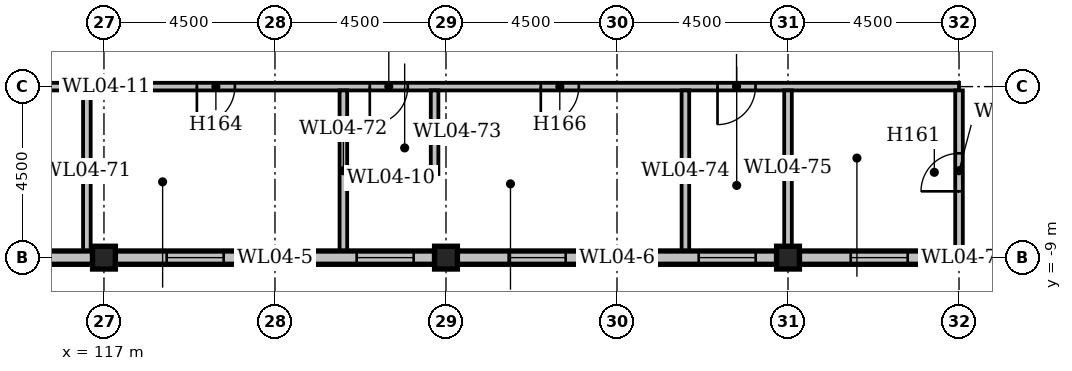
"""IFC4 building model, lengths in metres.
Left out: names, types, materials, properties, quantities, classifications, styles, units other than length and angle.
Written with IfcOpenShell. Run it as: python <this file> out.ifc"""

import sys

from ifc_helpers import new_model, si_unit, direction, frame, frame_2d, origin, origin_2d, place, context, subcontext, project, spatial, rectangle, extrude, element, fill, save


model = new_model("IFC4")
c1 = context("Model", 3, precision=1e-05, world=origin(), true_north=direction((0.0, 1.0)))
c2 = subcontext(c1, "Body", "Model", "MODEL_VIEW")
j1 = project(units=[si_unit("LENGTHUNIT", "METRE"), si_unit("PLANEANGLEUNIT", "RADIAN")], contexts=[c1])
p1 = place(None, origin())
s1 = spatial("IfcSite", under=j1, at=p1, CompositionType="ELEMENT")
p2 = place(p1, origin())
s2 = spatial("IfcBuilding", under=s1, at=p2, CompositionType="ELEMENT")
p3 = place(p2, frame((0.0, 0.0, 24.0)))
s3 = spatial("IfcBuildingStorey", under=s2, at=p3, CompositionType="ELEMENT", Elevation=24.0)
for number, where, z_axis, x_axis in (
    (1, (117.0, -9.0, 0.0), (0.0, 0.0, 1.0), (1.0, 0.0, 0.0)),
    (2, (126.0, -9.0, 0.0), (0.0, 0.0, 1.0), (1.0, 0.0, 0.0)),
    (3, (135.0, -9.0, 0.0), (0.0, 0.0, 1.0), (1.0, 0.0, 0.0)),
):
    element("IfcColumn", number, at=place(p3, frame(where, z_axis=z_axis, x_axis=x_axis)), inside=s3, PredefinedType="COLUMN", context=c2, shape_type="SweptSolid", body=[
        extrude(rectangle(XDim=0.6, YDim=0.6, at=origin_2d()), origin(), (0.0, 0.0, 1.0), 4.7),
    ])
p4 = place(p3, frame((108.3, -9.0, 0.0), z_axis=(0.0, 0.0, 1.0), x_axis=(1.0, 0.0, 0.0)))
e4 = element("IfcWall", 4, at=p4, inside=s3, PredefinedType="STANDARD", context=c2, shape_type="SweptSolid", body=[
    extrude(rectangle(XDim=8.4, YDim=0.35, at=frame_2d((4.2, 0.0))), origin(), (0.0, 0.0, 1.0), 4.1),
])
p5 = place(p4, frame((1.35, 0.0, 1.0)))
e5 = element("IfcOpeningElement", 5, at=p5, cuts=e4, PredefinedType="OPENING", context=c2, shape_type="SweptSolid", body=[
    extrude(rectangle(XDim=1.5, YDim=2.4, at=frame_2d((0.75, 1.2))), frame((0.0, 0.187, 0.0), z_axis=(0.0, -1.0, 0.0), x_axis=(1.0, 0.0, 0.0)), (0.0, 0.0, 1.0), 0.374),
])
p6 = place(p4, frame((5.55, 0.0, 1.0)))
e6 = element("IfcOpeningElement", 6, at=p6, cuts=e4, PredefinedType="OPENING", context=c2, shape_type="SweptSolid", body=[
    extrude(rectangle(XDim=1.5, YDim=2.4, at=frame_2d((0.75, 1.2))), frame((0.0, 0.187, 0.0), z_axis=(0.0, -1.0, 0.0), x_axis=(1.0, 0.0, 0.0)), (0.0, 0.0, 1.0), 0.374),
])
p7 = place(p3, frame((117.3, -9.0, 0.0), z_axis=(0.0, 0.0, 1.0), x_axis=(1.0, 0.0, 0.0)))
e7 = element("IfcWall", 7, at=p7, inside=s3, PredefinedType="STANDARD", context=c2, shape_type="SweptSolid", body=[
    extrude(rectangle(XDim=8.4, YDim=0.35, at=frame_2d((4.2, 0.0))), origin(), (0.0, 0.0, 1.0), 4.1),
])
p8 = place(p7, frame((1.35, 0.0, 1.0)))
e8 = element("IfcOpeningElement", 8, at=p8, cuts=e7, PredefinedType="OPENING", context=c2, shape_type="SweptSolid", body=[
    extrude(rectangle(XDim=1.5, YDim=2.4, at=frame_2d((0.75, 1.2))), frame((0.0, 0.187, 0.0), z_axis=(0.0, -1.0, 0.0), x_axis=(1.0, 0.0, 0.0)), (0.0, 0.0, 1.0), 0.374),
])
p9 = place(p7, frame((6.35, 0.0, 1.0)))
e9 = element("IfcOpeningElement", 9, at=p9, cuts=e7, PredefinedType="OPENING", context=c2, shape_type="SweptSolid", body=[
    extrude(rectangle(XDim=1.5, YDim=2.4, at=frame_2d((0.75, 1.2))), frame((0.0, 0.187, 0.0), z_axis=(0.0, -1.0, 0.0), x_axis=(1.0, 0.0, 0.0)), (0.0, 0.0, 1.0), 0.374),
])
p10 = place(p3, frame((126.3, -9.0, 0.0), z_axis=(0.0, 0.0, 1.0), x_axis=(1.0, 0.0, 0.0)))
e10 = element("IfcWall", 10, at=p10, inside=s3, PredefinedType="STANDARD", context=c2, shape_type="SweptSolid", body=[
    extrude(rectangle(XDim=8.4, YDim=0.35, at=frame_2d((4.2, 0.0))), origin(), (0.0, 0.0, 1.0), 4.1),
])
p11 = place(p10, frame((1.35, 0.0, 1.0)))
e11 = element("IfcOpeningElement", 11, at=p11, cuts=e10, PredefinedType="OPENING", context=c2, shape_type="SweptSolid", body=[
    extrude(rectangle(XDim=1.5, YDim=2.4, at=frame_2d((0.75, 1.2))), frame((0.0, 0.187, 0.0), z_axis=(0.0, -1.0, 0.0), x_axis=(1.0, 0.0, 0.0)), (0.0, 0.0, 1.0), 0.374),
])
p12 = place(p10, frame((6.35, 0.0, 1.0)))
e12 = element("IfcOpeningElement", 12, at=p12, cuts=e10, PredefinedType="OPENING", context=c2, shape_type="SweptSolid", body=[
    extrude(rectangle(XDim=1.5, YDim=2.4, at=frame_2d((0.75, 1.2))), frame((0.0, 0.187, 0.0), z_axis=(0.0, -1.0, 0.0), x_axis=(1.0, 0.0, 0.0)), (0.0, 0.0, 1.0), 0.374),
])
p13 = place(p3, frame((135.3, -9.0, 0.0), z_axis=(0.0, 0.0, 1.0), x_axis=(1.0, 0.0, 0.0)))
e13 = element("IfcWall", 13, at=p13, inside=s3, PredefinedType="STANDARD", context=c2, shape_type="SweptSolid", body=[
    extrude(rectangle(XDim=8.4, YDim=0.35, at=frame_2d((4.2, 0.0))), origin(), (0.0, 0.0, 1.0), 4.1),
])
p14 = place(p13, frame((1.35, 0.0, 1.0)))
e14 = element("IfcOpeningElement", 14, at=p14, cuts=e13, PredefinedType="OPENING", context=c2, shape_type="SweptSolid", body=[
    extrude(rectangle(XDim=1.5, YDim=2.4, at=frame_2d((0.75, 1.2))), frame((0.0, 0.187, 0.0), z_axis=(0.0, -1.0, 0.0), x_axis=(1.0, 0.0, 0.0)), (0.0, 0.0, 1.0), 0.374),
])
p15 = place(p3, frame((123.4, -6.9, 0.0), z_axis=(0.0, 0.0, 1.0), x_axis=(1.0, 0.0, 0.0)))
e15 = element("IfcWall", 15, at=p15, inside=s3, PredefinedType="STANDARD", context=c2, shape_type="SweptSolid", body=[
    extrude(rectangle(XDim=2.3, YDim=0.2, at=frame_2d((1.15, 0.0))), origin(), (0.0, 0.0, 1.0), 4.7),
])
p16 = place(p3, frame((94.625, -4.5, 0.0), z_axis=(0.0, 0.0, 1.0), x_axis=(1.0, 0.0, 0.0)))
e16 = element("IfcWall", 16, at=p16, inside=s3, PredefinedType="STANDARD", context=c2, shape_type="SweptSolid", body=[
    extrude(rectangle(XDim=44.875, YDim=0.2, at=frame_2d((22.438, 0.0))), origin(), (0.0, 0.0, 1.0), 4.7),
])
p17 = place(p16, frame((3.42, 0.0, 0.0)))
e17 = element("IfcOpeningElement", 17, at=p17, cuts=e16, PredefinedType="OPENING", context=c2, shape_type="SweptSolid", body=[
    extrude(rectangle(XDim=1.0, YDim=2.1, at=frame_2d((0.5, 1.05))), frame((0.0, 0.112, 0.0), z_axis=(0.0, -1.0, 0.0), x_axis=(1.0, 0.0, 0.0)), (0.0, 0.0, 1.0), 0.224),
])
p18 = place(p16, frame((10.17, 0.0, 0.0)))
e18 = element("IfcOpeningElement", 18, at=p18, cuts=e16, PredefinedType="OPENING", context=c2, shape_type="SweptSolid", body=[
    extrude(rectangle(XDim=1.0, YDim=2.1, at=frame_2d((0.5, 1.05))), frame((0.0, 0.112, 0.0), z_axis=(0.0, -1.0, 0.0), x_axis=(1.0, 0.0, 0.0)), (0.0, 0.0, 1.0), 0.224),
])
p19 = place(p16, frame((17.17, 0.0, 0.0)))
e19 = element("IfcOpeningElement", 19, at=p19, cuts=e16, PredefinedType="OPENING", context=c2, shape_type="SweptSolid", body=[
    extrude(rectangle(XDim=1.0, YDim=2.1, at=frame_2d((0.5, 1.05))), frame((0.0, 0.112, 0.0), z_axis=(0.0, -1.0, 0.0), x_axis=(1.0, 0.0, 0.0)), (0.0, 0.0, 1.0), 0.224),
])
p20 = place(p16, frame((24.82, 0.0, 0.0)))
e20 = element("IfcOpeningElement", 20, at=p20, cuts=e16, PredefinedType="OPENING", context=c2, shape_type="SweptSolid", body=[
    extrude(rectangle(XDim=1.0, YDim=2.1, at=frame_2d((0.5, 1.05))), frame((0.0, 0.112, 0.0), z_axis=(0.0, -1.0, 0.0), x_axis=(1.0, 0.0, 0.0)), (0.0, 0.0, 1.0), 0.224),
])
p21 = place(p16, frame((29.37, 0.0, 0.0)))
e21 = element("IfcOpeningElement", 21, at=p21, cuts=e16, PredefinedType="OPENING", context=c2, shape_type="SweptSolid", body=[
    extrude(rectangle(XDim=1.0, YDim=2.1, at=frame_2d((0.5, 1.05))), frame((0.0, 0.112, 0.0), z_axis=(0.0, -1.0, 0.0), x_axis=(1.0, 0.0, 0.0)), (0.0, 0.0, 1.0), 0.224),
])
p22 = place(p16, frame((33.87, 0.0, 0.0)))
e22 = element("IfcOpeningElement", 22, at=p22, cuts=e16, PredefinedType="OPENING", context=c2, shape_type="SweptSolid", body=[
    extrude(rectangle(XDim=1.0, YDim=2.1, at=frame_2d((0.5, 1.05))), frame((0.0, 0.112, 0.0), z_axis=(0.0, -1.0, 0.0), x_axis=(1.0, 0.0, 0.0)), (0.0, 0.0, 1.0), 0.224),
])
p23 = place(p16, frame((38.52, 0.0, 0.0)))
e23 = element("IfcOpeningElement", 23, at=p23, cuts=e16, PredefinedType="OPENING", context=c2, shape_type="SweptSolid", body=[
    extrude(rectangle(XDim=1.0, YDim=2.1, at=frame_2d((0.5, 1.05))), frame((0.0, 0.112, 0.0), z_axis=(0.0, -1.0, 0.0), x_axis=(1.0, 0.0, 0.0)), (0.0, 0.0, 1.0), 0.224),
])
for number, where, z_axis, x_axis in (
    (24, (116.55, -8.825, 0.0), (0.0, 0.0, 1.0), (0.0, 1.0, 0.0)),
    (25, (123.3, -8.825, 0.0), (0.0, 0.0, 1.0), (0.0, 1.0, 0.0)),
):
    element("IfcWall", number, at=place(p3, frame(where, z_axis=z_axis, x_axis=x_axis)), inside=s3, PredefinedType="STANDARD", context=c2, shape_type="SweptSolid", body=[
        extrude(rectangle(XDim=4.225, YDim=0.2, at=frame_2d((2.112, 0.0))), origin(), (0.0, 0.0, 1.0), 4.7),
    ])
p24 = place(p3, frame((125.7, -6.8, 0.0), z_axis=(0.0, 0.0, 1.0), x_axis=(0.0, 1.0, 0.0)))
e26 = element("IfcWall", 26, at=p24, inside=s3, PredefinedType="STANDARD", context=c2, shape_type="SweptSolid", body=[
    extrude(rectangle(XDim=2.2, YDim=0.2, at=frame_2d((1.1, 0.0))), origin(), (0.0, 0.0, 1.0), 4.7),
])
p25 = place(p3, frame((132.3, -8.825, 0.0), z_axis=(0.0, 0.0, 1.0), x_axis=(0.0, 1.0, 0.0)))
e27 = element("IfcWall", 27, at=p25, inside=s3, PredefinedType="STANDARD", context=c2, shape_type="SweptSolid", body=[
    extrude(rectangle(XDim=4.225, YDim=0.2, at=frame_2d((2.112, 0.0))), origin(), (0.0, 0.0, 1.0), 4.7),
])
p26 = place(p3, frame((135.0, -8.7, 0.0), z_axis=(0.0, 0.0, 1.0), x_axis=(0.0, 1.0, 0.0)))
e28 = element("IfcWall", 28, at=p26, inside=s3, PredefinedType="STANDARD", context=c2, shape_type="SweptSolid", body=[
    extrude(rectangle(XDim=4.1, YDim=0.2, at=frame_2d((2.05, 0.0))), origin(), (0.0, 0.0, 1.0), 4.7),
])
p27 = place(p3, frame((139.5, -8.825, 0.0), z_axis=(0.0, 0.0, 1.0), x_axis=(0.0, 1.0, 0.0)))
e29 = element("IfcWall", 29, at=p27, inside=s3, PredefinedType="STANDARD", context=c2, shape_type="SweptSolid", body=[
    extrude(rectangle(XDim=4.225, YDim=0.2, at=frame_2d((2.112, 0.0))), origin(), (0.0, 0.0, 1.0), 4.7),
])
p28 = place(p27, frame((1.57, 0.0, 0.0)))
e30 = element("IfcOpeningElement", 30, at=p28, cuts=e29, PredefinedType="OPENING", context=c2, shape_type="SweptSolid", body=[
    extrude(rectangle(XDim=1.0, YDim=2.1, at=frame_2d((0.5, 1.05))), frame((0.0, 0.112, 0.0), z_axis=(0.0, -1.0, 0.0), x_axis=(1.0, 0.0, 0.0)), (0.0, 0.0, 1.0), 0.224),
])
p29 = place(p3, frame((89.825, -9.05, 5.0), z_axis=(0.0, 0.0, 1.0), x_axis=(1.0, 0.0, 0.0)))
e31 = element("IfcWall", 31, at=p29, inside=s3, PredefinedType="STANDARD", context=c2, shape_type="SweptSolid", body=[
    extrude(rectangle(XDim=63.35, YDim=0.25, at=frame_2d((31.675, 0.0))), origin(), (0.0, 0.0, 1.0), 1.1),
])
p30 = place(p28, origin())
e32 = element("IfcDoor", 32, at=p30, inside=s3, OperationType="SINGLE_SWING_LEFT", PredefinedType="DOOR", context=c2, shape_type="SweptSolid", body=[
    extrude(rectangle(XDim=1.0, YDim=2.1, at=frame_2d((0.5, 1.05))), frame((0.0, 0.025, 0.0), z_axis=(0.0, -1.0, 0.0), x_axis=(1.0, 0.0, 0.0)), (0.0, 0.0, 1.0), 0.05),
])
fill(e30, e32)
p31 = place(p20, frame((1.0, 0.0, 0.0), z_axis=(0.0, 0.0, 1.0), x_axis=(-1.0, 0.0, 0.0)))
e33 = element("IfcDoor", 33, at=p31, inside=s3, OperationType="SINGLE_SWING_RIGHT", PredefinedType="DOOR", context=c2, shape_type="SweptSolid", body=[
    extrude(rectangle(XDim=1.0, YDim=2.1, at=frame_2d((0.5, 1.05))), frame((0.0, 0.025, 0.0), z_axis=(0.0, -1.0, 0.0), x_axis=(1.0, 0.0, 0.0)), (0.0, 0.0, 1.0), 0.05),
])
fill(e20, e33)
p32 = place(p21, frame((1.0, 0.0, 0.0), z_axis=(0.0, 0.0, 1.0), x_axis=(-1.0, 0.0, 0.0)))
e34 = element("IfcDoor", 34, at=p32, inside=s3, OperationType="SINGLE_SWING_RIGHT", PredefinedType="DOOR", context=c2, shape_type="SweptSolid", body=[
    extrude(rectangle(XDim=1.0, YDim=2.1, at=frame_2d((0.5, 1.05))), frame((0.0, 0.025, 0.0), z_axis=(0.0, -1.0, 0.0), x_axis=(1.0, 0.0, 0.0)), (0.0, 0.0, 1.0), 0.05),
])
fill(e21, e34)
p33 = place(p22, frame((1.0, 0.0, 0.0), z_axis=(0.0, 0.0, 1.0), x_axis=(-1.0, 0.0, 0.0)))
e35 = element("IfcDoor", 35, at=p33, inside=s3, OperationType="SINGLE_SWING_RIGHT", PredefinedType="DOOR", context=c2, shape_type="SweptSolid", body=[
    extrude(rectangle(XDim=1.0, YDim=2.1, at=frame_2d((0.5, 1.05))), frame((0.0, 0.025, 0.0), z_axis=(0.0, -1.0, 0.0), x_axis=(1.0, 0.0, 0.0)), (0.0, 0.0, 1.0), 0.05),
])
fill(e22, e35)
p34 = place(p23, frame((1.0, 0.0, 0.0), z_axis=(0.0, 0.0, 1.0), x_axis=(-1.0, 0.0, 0.0)))
e36 = element("IfcDoor", 36, at=p34, inside=s3, OperationType="SINGLE_SWING_RIGHT", PredefinedType="DOOR", context=c2, shape_type="SweptSolid", body=[
    extrude(rectangle(XDim=1.0, YDim=2.1, at=frame_2d((0.5, 1.05))), frame((0.0, 0.025, 0.0), z_axis=(0.0, -1.0, 0.0), x_axis=(1.0, 0.0, 0.0)), (0.0, 0.0, 1.0), 0.05),
])
fill(e23, e36)
p35 = place(p8, origin())
e37 = element("IfcWindow", 37, at=p35, inside=s3, PartitioningType="SINGLE_PANEL", PredefinedType="WINDOW", context=c2, shape_type="SweptSolid", body=[
    extrude(rectangle(XDim=1.5, YDim=2.4, at=frame_2d((0.75, 1.2))), frame((0.0, 0.03, 0.0), z_axis=(0.0, -1.0, 0.0), x_axis=(1.0, 0.0, 0.0)), (0.0, 0.0, 1.0), 0.06),
])
fill(e8, e37)
p36 = place(p9, origin())
e38 = element("IfcWindow", 38, at=p36, inside=s3, PartitioningType="SINGLE_PANEL", PredefinedType="WINDOW", context=c2, shape_type="SweptSolid", body=[
    extrude(rectangle(XDim=1.5, YDim=2.4, at=frame_2d((0.75, 1.2))), frame((0.0, 0.03, 0.0), z_axis=(0.0, -1.0, 0.0), x_axis=(1.0, 0.0, 0.0)), (0.0, 0.0, 1.0), 0.06),
])
fill(e9, e38)
p37 = place(p11, origin())
e39 = element("IfcWindow", 39, at=p37, inside=s3, PartitioningType="SINGLE_PANEL", PredefinedType="WINDOW", context=c2, shape_type="SweptSolid", body=[
    extrude(rectangle(XDim=1.5, YDim=2.4, at=frame_2d((0.75, 1.2))), frame((0.0, 0.03, 0.0), z_axis=(0.0, -1.0, 0.0), x_axis=(1.0, 0.0, 0.0)), (0.0, 0.0, 1.0), 0.06),
])
fill(e11, e39)
p38 = place(p12, origin())
e40 = element("IfcWindow", 40, at=p38, inside=s3, PartitioningType="SINGLE_PANEL", PredefinedType="WINDOW", context=c2, shape_type="SweptSolid", body=[
    extrude(rectangle(XDim=1.5, YDim=2.4, at=frame_2d((0.75, 1.2))), frame((0.0, 0.03, 0.0), z_axis=(0.0, -1.0, 0.0), x_axis=(1.0, 0.0, 0.0)), (0.0, 0.0, 1.0), 0.06),
])
fill(e12, e40)
p39 = place(p14, origin())
e41 = element("IfcWindow", 41, at=p39, inside=s3, PartitioningType="SINGLE_PANEL", PredefinedType="WINDOW", context=c2, shape_type="SweptSolid", body=[
    extrude(rectangle(XDim=1.5, YDim=2.4, at=frame_2d((0.75, 1.2))), frame((0.0, 0.03, 0.0), z_axis=(0.0, -1.0, 0.0), x_axis=(1.0, 0.0, 0.0)), (0.0, 0.0, 1.0), 0.06),
])
fill(e14, e41)
save(model, sys.argv[1])
